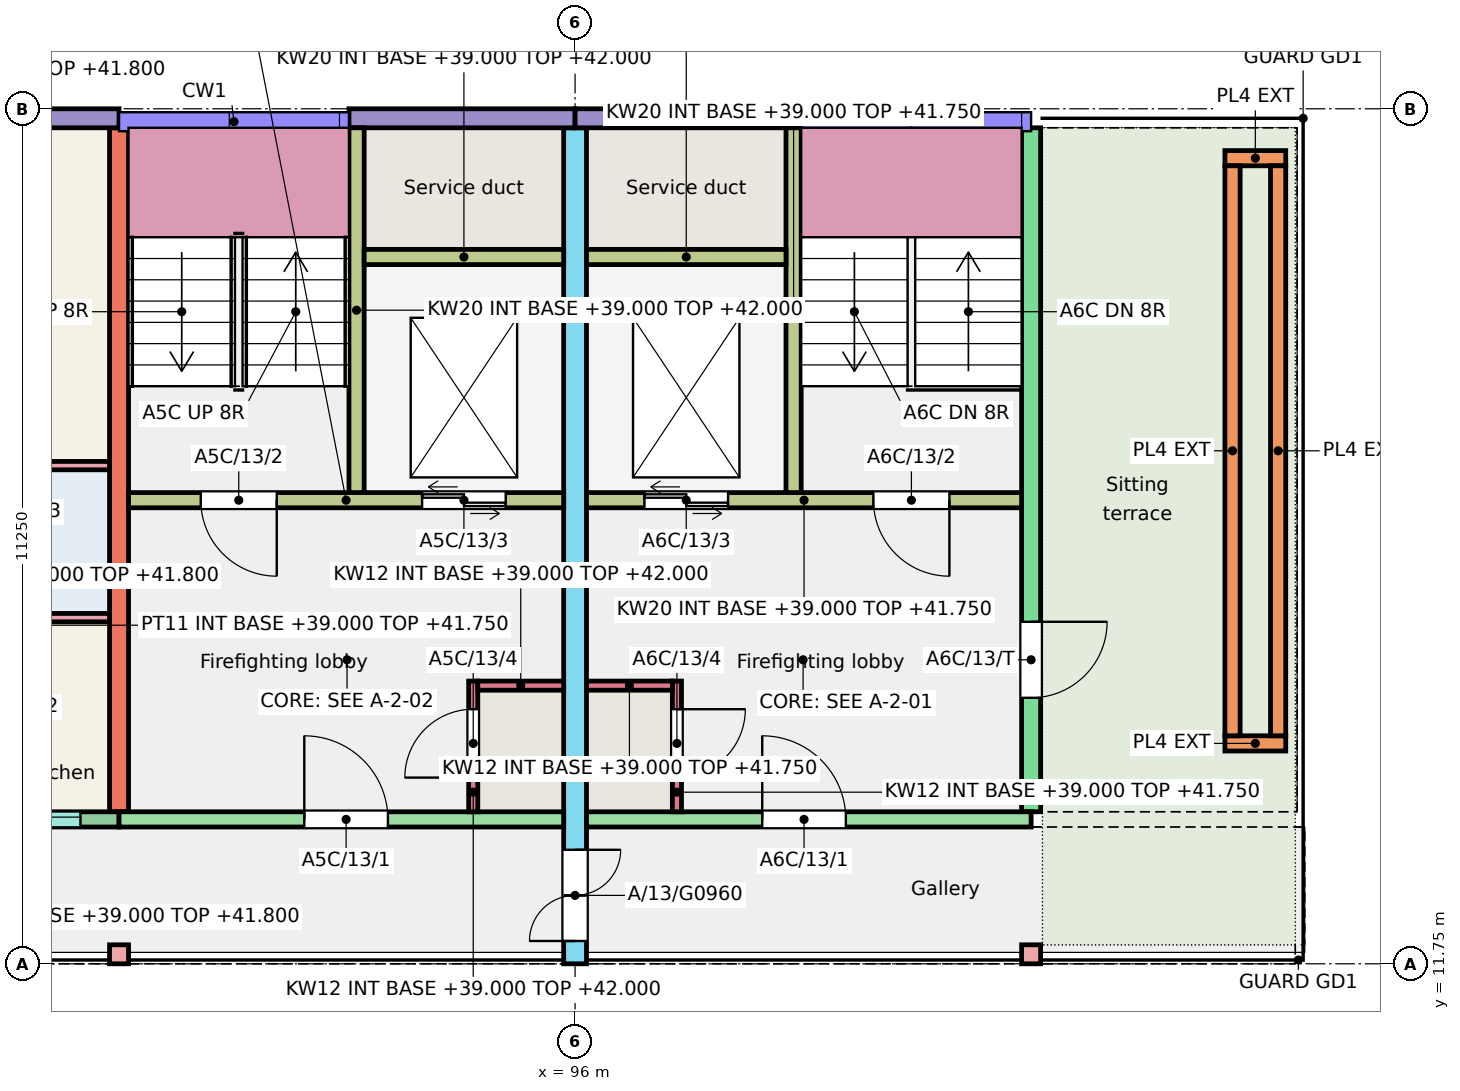
"""IFC4 building model, lengths in metres.
Left out: names, types, materials, properties, quantities, classifications, styles, units other than length and angle.
Written with IfcOpenShell. Run it as: python <this file> out.ifc"""

import sys

from ifc_helpers import new_model, si_unit, direction, frame, frame_2d, origin, origin_2d, place, context, subcontext, project, spatial, rectangle, extrude, element, fill, save


model = new_model("IFC4")
c1 = context("Model", 3, precision=1e-05, world=origin(), true_north=direction((0.0, 1.0)))
c2 = subcontext(c1, "Body", "Model", "MODEL_VIEW")
j1 = project(units=[si_unit("LENGTHUNIT", "METRE"), si_unit("PLANEANGLEUNIT", "RADIAN")], contexts=[c1])
p1 = place(None, origin())
s1 = spatial("IfcSite", under=j1, at=p1, CompositionType="ELEMENT")
p2 = place(p1, origin())
s2 = spatial("IfcBuilding", under=s1, at=p2, CompositionType="ELEMENT")
p3 = place(p2, frame((0.0, 0.0, 39.0)))
s3 = spatial("IfcBuildingStorey", under=s2, at=p3, CompositionType="ELEMENT", Elevation=39.0)
p4 = place(p3, frame((90.0, 13.75, 0.0), z_axis=(0.0, 0.0, 1.0), x_axis=(0.0, 1.0, 0.0)))
e1 = element("IfcWall", 1, at=p4, inside=s3, PredefinedType="SHEAR", context=c2, shape_type="SweptSolid", body=[
    extrude(rectangle(XDim=9.0, YDim=0.25, at=frame_2d((4.5, 0.0))), origin(), (0.0, 0.0, 1.0), 3.0),
])
p5 = place(p3, frame((96.0, 11.75, 0.0), z_axis=(0.0, 0.0, 1.0), x_axis=(0.0, 1.0, 0.0)))
e2 = element("IfcWall", 2, at=p5, inside=s3, PredefinedType="SHEAR", context=c2, shape_type="SweptSolid", body=[
    extrude(rectangle(XDim=11.0, YDim=0.3, at=frame_2d((5.5, 0.0))), origin(), (0.0, 0.0, 1.0), 3.0),
])
p6 = place(p5, frame((0.3, 0.0, 0.0)))
e3 = element("IfcOpeningElement", 3, at=p6, cuts=e2, PredefinedType="OPENING", context=c2, shape_type="SweptSolid", body=[
    extrude(rectangle(XDim=1.2, YDim=2.1, at=frame_2d((0.6, 1.05))), frame((0.0, 0.16, 0.0), z_axis=(0.0, -1.0, 0.0), x_axis=(1.0, 0.0, 0.0)), (0.0, 0.0, 1.0), 0.32),
])
p7 = place(p3, frame((102.0, 13.75, 0.0), z_axis=(0.0, 0.0, 1.0), x_axis=(0.0, 1.0, 0.0)))
e4 = element("IfcWall", 4, at=p7, inside=s3, PredefinedType="SHEAR", context=c2, shape_type="SweptSolid", body=[
    extrude(rectangle(XDim=9.0, YDim=0.25, at=frame_2d((4.5, 0.0))), origin(), (0.0, 0.0, 1.0), 3.0),
])
p8 = place(p7, frame((1.5, 0.0, 0.0)))
e5 = element("IfcOpeningElement", 5, at=p8, cuts=e4, PredefinedType="OPENING", context=c2, shape_type="SweptSolid", body=[
    extrude(rectangle(XDim=1.0, YDim=2.1, at=frame_2d((0.5, 1.05))), frame((0.0, 0.135, 0.0), z_axis=(0.0, -1.0, 0.0), x_axis=(1.0, 0.0, 0.0)), (0.0, 0.0, 1.0), 0.27),
])
p9 = place(p3, frame((86.4, 22.875, 0.0), z_axis=(0.0, 0.0, 1.0), x_axis=(1.0, 0.0, 0.0)))
e6 = element("IfcWall", 6, at=p9, inside=s3, PredefinedType="SOLIDWALL", context=c2, shape_type="SweptSolid", body=[
    extrude(rectangle(XDim=3.6, YDim=0.25, at=frame_2d((1.8, 0.0))), origin(), (0.0, 0.0, 1.0), 3.0),
])
p10 = place(p9, frame((1.188, 0.0, 0.8)))
e7 = element("IfcOpeningElement", 7, at=p10, cuts=e6, PredefinedType="OPENING", context=c2, shape_type="SweptSolid", body=[
    extrude(rectangle(XDim=1.2, YDim=1.6, at=frame_2d((0.6, 0.8))), frame((0.0, 0.135, 0.0), z_axis=(0.0, -1.0, 0.0), x_axis=(1.0, 0.0, 0.0)), (0.0, 0.0, 1.0), 0.27),
])
p11 = place(p3, frame((86.4, 13.65, 0.0), z_axis=(0.0, 0.0, 1.0), x_axis=(1.0, 0.0, 0.0)))
e8 = element("IfcWall", 8, at=p11, inside=s3, PredefinedType="SOLIDWALL", context=c2, shape_type="SweptSolid", body=[
    extrude(rectangle(XDim=3.6, YDim=0.2, at=frame_2d((1.8, 0.0))), origin(), (0.0, 0.0, 1.0), 3.0),
])
p12 = place(p11, frame((1.893, 0.0, 1.1)))
e9 = element("IfcOpeningElement", 9, at=p12, cuts=e8, PredefinedType="OPENING", context=c2, shape_type="SweptSolid", body=[
    extrude(rectangle(XDim=1.2, YDim=1.3, at=frame_2d((0.6, 0.65))), frame((0.0, 0.11, 0.0), z_axis=(0.0, -1.0, 0.0), x_axis=(1.0, 0.0, 0.0)), (0.0, 0.0, 1.0), 0.22),
])
p13 = place(p11, frame((0.25, 0.0, 0.0)))
e10 = element("IfcOpeningElement", 10, at=p13, cuts=e8, PredefinedType="OPENING", context=c2, shape_type="SweptSolid", body=[
    extrude(rectangle(XDim=1.0, YDim=2.1, at=frame_2d((0.5, 1.05))), frame((0.0, 0.11, 0.0), z_axis=(0.0, -1.0, 0.0), x_axis=(1.0, 0.0, 0.0)), (0.0, 0.0, 1.0), 0.22),
])
p14 = place(p3, frame((93.025, 22.875, 0.0), z_axis=(0.0, 0.0, 1.0), x_axis=(1.0, 0.0, 0.0)))
e11 = element("IfcWall", 11, at=p14, inside=s3, PredefinedType="SOLIDWALL", context=c2, shape_type="SweptSolid", body=[
    extrude(rectangle(XDim=2.975, YDim=0.25, at=frame_2d((1.488, 0.0))), origin(), (0.0, 0.0, 1.0), 3.0),
])
p15 = place(p3, frame((90.0, 13.65, 0.0), z_axis=(0.0, 0.0, 1.0), x_axis=(1.0, 0.0, 0.0)))
e12 = element("IfcWall", 12, at=p15, inside=s3, PredefinedType="SHEAR", context=c2, shape_type="SweptSolid", body=[
    extrude(rectangle(XDim=5.85, YDim=0.2, at=frame_2d((2.925, 0.0))), origin(), (0.0, 0.0, 1.0), 3.0),
])
p16 = place(p15, frame((2.438, 0.0, 0.0)))
e13 = element("IfcOpeningElement", 13, at=p16, cuts=e12, PredefinedType="OPENING", context=c2, shape_type="SweptSolid", body=[
    extrude(rectangle(XDim=1.1, YDim=2.1, at=frame_2d((0.55, 1.05))), frame((0.0, 0.11, 0.0), z_axis=(0.0, -1.0, 0.0), x_axis=(1.0, 0.0, 0.0)), (0.0, 0.0, 1.0), 0.22),
])
p17 = place(p3, frame((90.125, 17.85, 0.0), z_axis=(0.0, 0.0, 1.0), x_axis=(1.0, 0.0, 0.0)))
e14 = element("IfcWall", 14, at=p17, inside=s3, PredefinedType="SHEAR", context=c2, shape_type="SweptSolid", body=[
    extrude(rectangle(XDim=5.725, YDim=0.2, at=frame_2d((2.863, 0.0))), origin(), (0.0, 0.0, 1.0), 3.0),
])
p18 = place(p17, frame((0.95, 0.0, 0.0)))
e15 = element("IfcOpeningElement", 15, at=p18, cuts=e14, PredefinedType="OPENING", context=c2, shape_type="SweptSolid", body=[
    extrude(rectangle(XDim=1.0, YDim=2.1, at=frame_2d((0.5, 1.05))), frame((0.0, 0.11, 0.0), z_axis=(0.0, -1.0, 0.0), x_axis=(1.0, 0.0, 0.0)), (0.0, 0.0, 1.0), 0.22),
])
p19 = place(p17, frame((3.863, 0.0, 0.0)))
e16 = element("IfcOpeningElement", 16, at=p19, cuts=e14, PredefinedType="OPENING", context=c2, shape_type="SweptSolid", body=[
    extrude(rectangle(XDim=1.1, YDim=2.1, at=frame_2d((0.55, 1.05))), frame((0.0, 0.11, 0.0), z_axis=(0.0, -1.0, 0.0), x_axis=(1.0, 0.0, 0.0)), (0.0, 0.0, 1.0), 0.22),
])
p20 = place(p3, frame((93.125, 17.95, 0.0), z_axis=(0.0, 0.0, 1.0), x_axis=(0.0, 1.0, 0.0)))
e17 = element("IfcWall", 17, at=p20, inside=s3, PredefinedType="SHEAR", context=c2, shape_type="SweptSolid", body=[
    extrude(rectangle(XDim=4.8, YDim=0.2, at=frame_2d((2.4, 0.0))), origin(), (0.0, 0.0, 1.0), 3.0),
])
p21 = place(p3, frame((93.225, 21.05, 0.0), z_axis=(0.0, 0.0, 1.0), x_axis=(1.0, 0.0, 0.0)))
e18 = element("IfcWall", 18, at=p21, inside=s3, PredefinedType="SHEAR", context=c2, shape_type="SweptSolid", body=[
    extrude(rectangle(XDim=2.625, YDim=0.2, at=frame_2d((1.312, 0.0))), origin(), (0.0, 0.0, 1.0), 3.0),
])
p22 = place(p3, frame((94.66, 13.75, 0.0), z_axis=(0.0, 0.0, 1.0), x_axis=(0.0, 1.0, 0.0)))
e19 = element("IfcWall", 19, at=p22, inside=s3, PredefinedType="SHEAR", context=c2, shape_type="SweptSolid", body=[
    extrude(rectangle(XDim=1.72, YDim=0.12, at=frame_2d((0.86, 0.0))), origin(), (0.0, 0.0, 1.0), 3.0),
])
p23 = place(p22, frame((0.45, 0.0, 0.0)))
e20 = element("IfcOpeningElement", 20, at=p23, cuts=e19, PredefinedType="OPENING", context=c2, shape_type="SweptSolid", body=[
    extrude(rectangle(XDim=0.9, YDim=2.1, at=frame_2d((0.45, 1.05))), frame((0.0, 0.07, 0.0), z_axis=(0.0, -1.0, 0.0), x_axis=(1.0, 0.0, 0.0)), (0.0, 0.0, 1.0), 0.14),
])
p24 = place(p3, frame((94.72, 15.41, 0.0), z_axis=(0.0, 0.0, 1.0), x_axis=(1.0, 0.0, 0.0)))
e21 = element("IfcWall", 21, at=p24, inside=s3, PredefinedType="SHEAR", context=c2, shape_type="SweptSolid", body=[
    extrude(rectangle(XDim=1.13, YDim=0.12, at=frame_2d((0.565, 0.0))), origin(), (0.0, 0.0, 1.0), 3.0),
])
p25 = place(p3, frame((96.0, 22.875, 0.0), z_axis=(0.0, 0.0, 1.0), x_axis=(1.0, 0.0, 0.0)))
e22 = element("IfcWall", 22, at=p25, inside=s3, PredefinedType="SOLIDWALL", context=c2, shape_type="SweptSolid", body=[
    extrude(rectangle(XDim=2.975, YDim=0.25, at=frame_2d((1.488, 0.0))), origin(), (0.0, 0.0, 1.0), 3.0),
])
p26 = place(p3, frame((96.15, 13.65, 0.0), z_axis=(0.0, 0.0, 1.0), x_axis=(1.0, 0.0, 0.0)))
e23 = element("IfcWall", 23, at=p26, inside=s3, PredefinedType="SHEAR", context=c2, shape_type="SweptSolid", body=[
    extrude(rectangle(XDim=5.85, YDim=0.2, at=frame_2d((2.925, 0.0))), origin(), (0.0, 0.0, 1.0), 2.75),
])
p27 = place(p26, frame((2.312, 0.0, 0.0)))
e24 = element("IfcOpeningElement", 24, at=p27, cuts=e23, PredefinedType="OPENING", context=c2, shape_type="SweptSolid", body=[
    extrude(rectangle(XDim=1.1, YDim=2.1, at=frame_2d((0.55, 1.05))), frame((0.0, 0.11, 0.0), z_axis=(0.0, -1.0, 0.0), x_axis=(1.0, 0.0, 0.0)), (0.0, 0.0, 1.0), 0.22),
])
p28 = place(p3, frame((96.15, 17.85, 0.0), z_axis=(0.0, 0.0, 1.0), x_axis=(1.0, 0.0, 0.0)))
e25 = element("IfcWall", 25, at=p28, inside=s3, PredefinedType="SHEAR", context=c2, shape_type="SweptSolid", body=[
    extrude(rectangle(XDim=5.725, YDim=0.2, at=frame_2d((2.863, 0.0))), origin(), (0.0, 0.0, 1.0), 2.75),
])
p29 = place(p28, frame((3.775, 0.0, 0.0)))
e26 = element("IfcOpeningElement", 26, at=p29, cuts=e25, PredefinedType="OPENING", context=c2, shape_type="SweptSolid", body=[
    extrude(rectangle(XDim=1.0, YDim=2.1, at=frame_2d((0.5, 1.05))), frame((0.0, 0.11, 0.0), z_axis=(0.0, -1.0, 0.0), x_axis=(1.0, 0.0, 0.0)), (0.0, 0.0, 1.0), 0.22),
])
p30 = place(p28, frame((0.762, 0.0, 0.0)))
e27 = element("IfcOpeningElement", 27, at=p30, cuts=e25, PredefinedType="OPENING", context=c2, shape_type="SweptSolid", body=[
    extrude(rectangle(XDim=1.1, YDim=2.1, at=frame_2d((0.55, 1.05))), frame((0.0, 0.11, 0.0), z_axis=(0.0, -1.0, 0.0), x_axis=(1.0, 0.0, 0.0)), (0.0, 0.0, 1.0), 0.22),
])
p31 = place(p3, frame((98.875, 17.95, 0.0), z_axis=(0.0, 0.0, 1.0), x_axis=(0.0, 1.0, 0.0)))
e28 = element("IfcWall", 28, at=p31, inside=s3, PredefinedType="SHEAR", context=c2, shape_type="SweptSolid", body=[
    extrude(rectangle(XDim=4.8, YDim=0.2, at=frame_2d((2.4, 0.0))), origin(), (0.0, 0.0, 1.0), 2.75),
])
p32 = place(p3, frame((96.15, 21.05, 0.0), z_axis=(0.0, 0.0, 1.0), x_axis=(1.0, 0.0, 0.0)))
e29 = element("IfcWall", 29, at=p32, inside=s3, PredefinedType="SHEAR", context=c2, shape_type="SweptSolid", body=[
    extrude(rectangle(XDim=2.625, YDim=0.2, at=frame_2d((1.312, 0.0))), origin(), (0.0, 0.0, 1.0), 2.75),
])
p33 = place(p3, frame((97.34, 13.75, 0.0), z_axis=(0.0, 0.0, 1.0), x_axis=(0.0, 1.0, 0.0)))
e30 = element("IfcWall", 30, at=p33, inside=s3, PredefinedType="SHEAR", context=c2, shape_type="SweptSolid", body=[
    extrude(rectangle(XDim=1.72, YDim=0.12, at=frame_2d((0.86, 0.0))), origin(), (0.0, 0.0, 1.0), 2.75),
])
p34 = place(p33, frame((0.45, 0.0, 0.0)))
e31 = element("IfcOpeningElement", 31, at=p34, cuts=e30, PredefinedType="OPENING", context=c2, shape_type="SweptSolid", body=[
    extrude(rectangle(XDim=0.9, YDim=2.1, at=frame_2d((0.45, 1.05))), frame((0.0, 0.07, 0.0), z_axis=(0.0, -1.0, 0.0), x_axis=(1.0, 0.0, 0.0)), (0.0, 0.0, 1.0), 0.14),
])
p35 = place(p3, frame((96.15, 15.41, 0.0), z_axis=(0.0, 0.0, 1.0), x_axis=(1.0, 0.0, 0.0)))
e32 = element("IfcWall", 32, at=p35, inside=s3, PredefinedType="SHEAR", context=c2, shape_type="SweptSolid", body=[
    extrude(rectangle(XDim=1.13, YDim=0.12, at=frame_2d((0.565, 0.0))), origin(), (0.0, 0.0, 1.0), 2.75),
])
for number, where, z_axis, x_axis in (
    (33, (90.0, 11.875, 0.0), (0.0, 0.0, 1.0), (1.0, 0.0, 0.0)),
    (34, (102.0, 11.875, 0.0), (0.0, 0.0, 1.0), (1.0, 0.0, 0.0)),
):
    element("IfcColumn", number, at=place(p3, frame(where, z_axis=z_axis, x_axis=x_axis)), inside=s3, PredefinedType="COLUMN", context=c2, shape_type="SweptSolid", body=[
        extrude(rectangle(XDim=0.25, YDim=0.25, at=origin_2d()), origin(), (0.0, 0.0, 1.0), 3.0),
    ])
for number, where, z_axis, x_axis in (
    (35, (104.55, 14.65, 0.01), (0.0, 0.0, 1.0), (1.0, 0.0, 0.0)),
    (36, (104.55, 22.35, 0.01), (0.0, 0.0, 1.0), (1.0, 0.0, 0.0)),
):
    element("IfcWall", number, at=place(p3, frame(where, z_axis=z_axis, x_axis=x_axis)), inside=s3, PredefinedType="SOLIDWALL", context=c2, shape_type="SweptSolid", body=[
        extrude(rectangle(XDim=0.8, YDim=0.2, at=frame_2d((0.4, 0.0))), origin(), (0.0, 0.0, 1.0), 0.45),
    ])
for number, where, z_axis, x_axis in (
    (37, (104.65, 14.75, 0.01), (0.0, 0.0, 1.0), (0.0, 1.0, 0.0)),
    (38, (105.25, 14.75, 0.01), (0.0, 0.0, 1.0), (0.0, 1.0, 0.0)),
):
    element("IfcWall", number, at=place(p3, frame(where, z_axis=z_axis, x_axis=x_axis)), inside=s3, PredefinedType="SOLIDWALL", context=c2, shape_type="SweptSolid", body=[
        extrude(rectangle(XDim=7.5, YDim=0.2, at=frame_2d((3.75, 0.0))), origin(), (0.0, 0.0, 1.0), 0.45),
    ])
p36 = place(p3, frame((87.91, 16.305, 0.0), z_axis=(0.0, 0.0, 1.0), x_axis=(1.0, 0.0, 0.0)))
e39 = element("IfcWall", 39, at=p36, inside=s3, PredefinedType="PARTITIONING", context=c2, shape_type="SweptSolid", body=[
    extrude(rectangle(XDim=1.965, YDim=0.11, at=frame_2d((0.982, 0.0))), origin(), (0.0, 0.0, 1.0), 2.8),
])
p37 = place(p3, frame((86.5, 18.305, 0.0), z_axis=(0.0, 0.0, 1.0), x_axis=(1.0, 0.0, 0.0)))
e40 = element("IfcWall", 40, at=p37, inside=s3, PredefinedType="PARTITIONING", context=c2, shape_type="SweptSolid", body=[
    extrude(rectangle(XDim=3.375, YDim=0.11, at=frame_2d((1.688, 0.0))), origin(), (0.0, 0.0, 1.0), 2.8),
])
p38 = place(p37, frame((0.2, 0.0, 0.0)))
e41 = element("IfcOpeningElement", 41, at=p38, cuts=e40, PredefinedType="OPENING", context=c2, shape_type="SweptSolid", body=[
    extrude(rectangle(XDim=0.9, YDim=2.1, at=frame_2d((0.45, 1.05))), frame((0.0, 0.065, 0.0), z_axis=(0.0, -1.0, 0.0), x_axis=(1.0, 0.0, 0.0)), (0.0, 0.0, 1.0), 0.13),
])
p39 = place(p12, origin())
e42 = element("IfcWindow", 42, at=p39, inside=s3, PartitioningType="SINGLE_PANEL", PredefinedType="WINDOW", context=c2, shape_type="SweptSolid", body=[
    extrude(rectangle(XDim=1.2, YDim=1.3, at=frame_2d((0.6, 0.65))), frame((0.0, 0.06, 0.0), z_axis=(0.0, -1.0, 0.0), x_axis=(1.0, 0.0, 0.0)), (0.0, 0.0, 1.0), 0.06),
])
fill(e9, e42)
p40 = place(p16, origin())
e43 = element("IfcDoor", 43, at=p40, inside=s3, OperationType="SINGLE_SWING_LEFT", PredefinedType="DOOR", context=c2, shape_type="SweptSolid", body=[
    extrude(rectangle(XDim=1.1, YDim=2.1, at=frame_2d((0.55, 1.05))), frame((0.0, 0.025, 0.0), z_axis=(0.0, -1.0, 0.0), x_axis=(1.0, 0.0, 0.0)), (0.0, 0.0, 1.0), 0.05),
])
fill(e13, e43)
p41 = place(p18, origin())
e44 = element("IfcDoor", 44, at=p41, inside=s3, OperationType="SINGLE_SWING_RIGHT", PredefinedType="DOOR", context=c2, shape_type="SweptSolid", body=[
    extrude(rectangle(XDim=1.0, YDim=2.1, at=frame_2d((0.5, 1.05))), frame((0.0, 0.025, 0.0), z_axis=(0.0, -1.0, 0.0), x_axis=(1.0, 0.0, 0.0)), (0.0, 0.0, 1.0), 0.05),
])
fill(e15, e44)
p42 = place(p19, origin())
e45 = element("IfcDoor", 45, at=p42, inside=s3, OperationType="DOUBLE_DOOR_SLIDING", PredefinedType="DOOR", context=c2, shape_type="SweptSolid", body=[
    extrude(rectangle(XDim=1.1, YDim=2.1, at=frame_2d((0.55, 1.05))), frame((0.0, 0.025, 0.0), z_axis=(0.0, -1.0, 0.0), x_axis=(1.0, 0.0, 0.0)), (0.0, 0.0, 1.0), 0.05),
])
fill(e16, e45)
p43 = place(p23, origin())
e46 = element("IfcDoor", 46, at=p43, inside=s3, OperationType="SINGLE_SWING_LEFT", PredefinedType="DOOR", context=c2, shape_type="SweptSolid", body=[
    extrude(rectangle(XDim=0.9, YDim=2.1, at=frame_2d((0.45, 1.05))), frame((0.0, 0.025, 0.0), z_axis=(0.0, -1.0, 0.0), x_axis=(1.0, 0.0, 0.0)), (0.0, 0.0, 1.0), 0.05),
])
fill(e20, e46)
p44 = place(p27, origin())
e47 = element("IfcDoor", 47, at=p44, inside=s3, OperationType="SINGLE_SWING_LEFT", PredefinedType="DOOR", context=c2, shape_type="SweptSolid", body=[
    extrude(rectangle(XDim=1.1, YDim=2.1, at=frame_2d((0.55, 1.05))), frame((0.0, 0.025, 0.0), z_axis=(0.0, -1.0, 0.0), x_axis=(1.0, 0.0, 0.0)), (0.0, 0.0, 1.0), 0.05),
])
fill(e24, e47)
p45 = place(p29, origin())
e48 = element("IfcDoor", 48, at=p45, inside=s3, OperationType="SINGLE_SWING_RIGHT", PredefinedType="DOOR", context=c2, shape_type="SweptSolid", body=[
    extrude(rectangle(XDim=1.0, YDim=2.1, at=frame_2d((0.5, 1.05))), frame((0.0, 0.025, 0.0), z_axis=(0.0, -1.0, 0.0), x_axis=(1.0, 0.0, 0.0)), (0.0, 0.0, 1.0), 0.05),
])
fill(e26, e48)
p46 = place(p30, origin())
e49 = element("IfcDoor", 49, at=p46, inside=s3, OperationType="DOUBLE_DOOR_SLIDING", PredefinedType="DOOR", context=c2, shape_type="SweptSolid", body=[
    extrude(rectangle(XDim=1.1, YDim=2.1, at=frame_2d((0.55, 1.05))), frame((0.0, 0.025, 0.0), z_axis=(0.0, -1.0, 0.0), x_axis=(1.0, 0.0, 0.0)), (0.0, 0.0, 1.0), 0.05),
])
fill(e27, e49)
p47 = place(p34, origin())
e50 = element("IfcDoor", 50, at=p47, inside=s3, OperationType="SINGLE_SWING_RIGHT", PredefinedType="DOOR", context=c2, shape_type="SweptSolid", body=[
    extrude(rectangle(XDim=0.9, YDim=2.1, at=frame_2d((0.45, 1.05))), frame((0.0, 0.025, 0.0), z_axis=(0.0, -1.0, 0.0), x_axis=(1.0, 0.0, 0.0)), (0.0, 0.0, 1.0), 0.05),
])
fill(e31, e50)
p48 = place(p8, origin())
e51 = element("IfcDoor", 51, at=p48, inside=s3, OperationType="SINGLE_SWING_RIGHT", PredefinedType="DOOR", context=c2, shape_type="SweptSolid", body=[
    extrude(rectangle(XDim=1.0, YDim=2.1, at=frame_2d((0.5, 1.05))), frame((0.0, 0.025, 0.0), z_axis=(0.0, -1.0, 0.0), x_axis=(1.0, 0.0, 0.0)), (0.0, 0.0, 1.0), 0.05),
])
fill(e5, e51)
p49 = place(p6, origin())
e52 = element("IfcDoor", 52, at=p49, inside=s3, OperationType="DOUBLE_DOOR_SINGLE_SWING", PredefinedType="DOOR", context=c2, shape_type="SweptSolid", body=[
    extrude(rectangle(XDim=1.2, YDim=2.1, at=frame_2d((0.6, 1.05))), frame((0.0, 0.025, 0.0), z_axis=(0.0, -1.0, 0.0), x_axis=(1.0, 0.0, 0.0)), (0.0, 0.0, 1.0), 0.05),
])
fill(e3, e52)
save(model, sys.argv[1])
